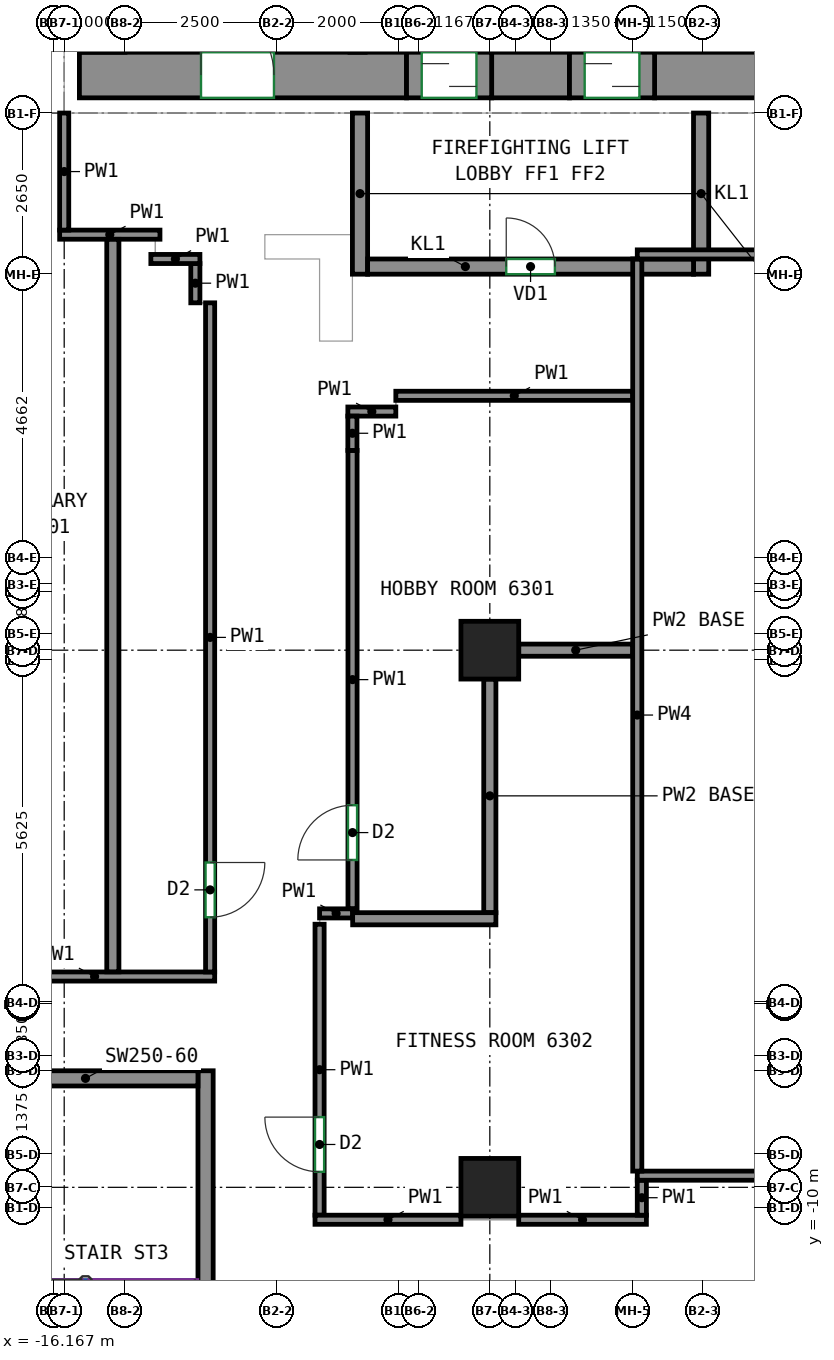
"""IFC4 building model, lengths in metres.
Left out: names, types, materials, properties, quantities, classifications, styles, units other than length and angle.
Written with IfcOpenShell. Run it as: python <this file> out.ifc"""

import sys

from ifc_helpers import new_model, si_unit, direction, frame, frame_2d, origin, origin_2d, place, context, subcontext, project, spatial, rectangle, extrude, source, transform, mapped, element, fill, save


model = new_model("IFC4")
c1 = context("Model", 3, precision=1e-05, world=origin(), true_north=direction((0.0, 1.0)))
c2 = subcontext(c1, "Body", "Model", "MODEL_VIEW")
j1 = project(units=[si_unit("LENGTHUNIT", "METRE"), si_unit("PLANEANGLEUNIT", "RADIAN")], contexts=[c1])
p1 = place(None, origin())
s1 = spatial("IfcSite", under=j1, at=p1, CompositionType="ELEMENT")
p2 = place(p1, origin())
s2 = spatial("IfcBuilding", under=s1, at=p2, CompositionType="ELEMENT")
p3 = place(p2, frame((0.0, 0.0, 259.4)))
s3 = spatial("IfcBuildingStorey", under=s2, at=p3, CompositionType="ELEMENT", Elevation=259.4)
m1 = source(origin(), c2, "Body", "SweptSolid", [
    extrude(rectangle(XDim=0.95, YDim=0.95, at=origin_2d()), origin(), (0.0, 0.0, 1.0), 3.0),
])
for number, where, z_axis, x_axis in (
    (1, (-9.0, -9.667, 0.0), (0.0, 0.0, 1.0), (1.0, 0.0, 0.0)),
    (2, (-9.0, -0.833, 0.0), (0.0, 0.0, 1.0), (1.0, 0.0, 0.0)),
):
    element("IfcColumn", number, at=place(p3, frame(where, z_axis=z_axis, x_axis=x_axis)), inside=s3, PredefinedType="COLUMN", context=c2, shape_type="MappedRepresentation", body=[
        mapped(m1, transform((0.0, 0.0, 0.0))),
    ])
m2 = source(origin(), c2, "Body", "SweptSolid", [
    extrude(rectangle(XDim=5.38, YDim=0.75, at=frame_2d((2.69, 0.0))), origin(), (0.0, 0.0, 1.0), 3.0),
])
p4 = place(p3, frame((-15.75, 8.625, 0.0), z_axis=(0.0, 0.0, 1.0), x_axis=(1.0, 0.0, 0.0)))
e3 = element("IfcWall", 3, at=p4, inside=s3, PredefinedType="SHEAR", context=c2, shape_type="MappedRepresentation", body=[
    mapped(m2, transform((0.0, 0.0, 0.0))),
])
p5 = place(p4, frame((2.0, 0.0, 0.0)))
e4 = element("IfcOpeningElement", 4, at=p5, cuts=e3, PredefinedType="OPENING", context=c2, shape_type="SweptSolid", body=[
    extrude(rectangle(XDim=1.2, YDim=2.1, at=frame_2d((0.6, 1.05))), frame((0.0, 0.385, 0.0), z_axis=(0.0, -1.0, 0.0), x_axis=(1.0, 0.0, 0.0)), (0.0, 0.0, 1.0), 0.77),
])
m3 = source(origin(), c2, "Body", "SweptSolid", [
    extrude(rectangle(XDim=1.28, YDim=0.75, at=frame_2d((0.64, 0.0))), origin(), (0.0, 0.0, 1.0), 3.0),
])
p6 = place(p3, frame((-8.97, 8.625, 0.0), z_axis=(0.0, 0.0, 1.0), x_axis=(1.0, 0.0, 0.0)))
e5 = element("IfcWall", 5, at=p6, inside=s3, PredefinedType="SHEAR", context=c2, shape_type="MappedRepresentation", body=[
    mapped(m3, transform((0.0, 0.0, 0.0))),
])
m4 = source(origin(), c2, "Body", "SweptSolid", [
    extrude(rectangle(XDim=14.18, YDim=0.75, at=frame_2d((7.09, 0.0))), origin(), (0.0, 0.0, 1.0), 3.0),
])
p7 = place(p3, frame((-6.29, 8.625, 0.0), z_axis=(0.0, 0.0, 1.0), x_axis=(1.0, 0.0, 0.0)))
e6 = element("IfcWall", 6, at=p7, inside=s3, PredefinedType="SHEAR", context=c2, shape_type="MappedRepresentation", body=[
    mapped(m4, transform((0.0, 0.0, 0.0))),
])
m5 = source(origin(), c2, "Body", "SweptSolid", [
    extrude(rectangle(XDim=8.0, YDim=0.25, at=frame_2d((4.0, 0.0))), origin(), (0.0, 0.0, 1.0), 3.0),
])
p8 = place(p3, frame((-13.675, -15.75, 0.0), z_axis=(0.0, 0.0, 1.0), x_axis=(0.0, 1.0, 0.0)))
e7 = element("IfcWall", 7, at=p8, inside=s3, PredefinedType="SHEAR", context=c2, shape_type="MappedRepresentation", body=[
    mapped(m5, transform((0.0, 0.0, 0.0))),
])
m6 = source(origin(), c2, "Body", "SweptSolid", [
    extrude(rectangle(XDim=3.7, YDim=0.25, at=frame_2d((1.85, 0.0))), origin(), (0.0, 0.0, 1.0), 3.0),
])
p9 = place(p3, frame((-17.5, -7.875, 0.0), z_axis=(0.0, 0.0, 1.0), x_axis=(1.0, 0.0, 0.0)))
e8 = element("IfcWall", 8, at=p9, inside=s3, PredefinedType="SHEAR", context=c2, shape_type="MappedRepresentation", body=[
    mapped(m6, transform((0.0, 0.0, 0.0))),
])
m7 = source(origin(), c2, "Body", "SweptSolid", [
    extrude(rectangle(XDim=2.65, YDim=0.25, at=frame_2d((1.325, 0.0))), origin(), (0.0, 0.0, 1.0), 2.45),
])
for number, where, z_axis, x_axis in (
    (9, (-11.135, 5.35, 0.0), (0.0, 0.0, 1.0), (0.0, 1.0, 0.0)),
    (10, (-5.525, 5.35, 0.0), (0.0, 0.0, 1.0), (0.0, 1.0, 0.0)),
):
    element("IfcWall", number, at=place(p3, frame(where, z_axis=z_axis, x_axis=x_axis)), inside=s3, PredefinedType="PARTITIONING", context=c2, shape_type="MappedRepresentation", body=[
        mapped(m7, transform((0.0, 0.0, 0.0))),
    ])
m8 = source(origin(), c2, "Body", "SweptSolid", [
    extrude(rectangle(XDim=5.36, YDim=0.25, at=frame_2d((2.68, 0.0))), origin(), (0.0, 0.0, 1.0), 3.0),
])
p10 = place(p3, frame((-11.01, 5.475, 0.0), z_axis=(0.0, 0.0, 1.0), x_axis=(1.0, 0.0, 0.0)))
e11 = element("IfcWall", 11, at=p10, inside=s3, PredefinedType="PARTITIONING", context=c2, shape_type="MappedRepresentation", body=[
    mapped(m8, transform((0.0, 0.0, 0.0))),
])
p11 = place(p10, frame((2.28, 0.0, 0.0)))
e12 = element("IfcOpeningElement", 12, at=p11, cuts=e11, PredefinedType="OPENING", context=c2, shape_type="SweptSolid", body=[
    extrude(rectangle(XDim=0.8, YDim=2.0, at=frame_2d((0.4, 1.0))), frame((0.0, 0.135, 0.0), z_axis=(0.0, -1.0, 0.0), x_axis=(1.0, 0.0, 0.0)), (0.0, 0.0, 1.0), 0.27),
])
m9 = source(origin(), c2, "Body", "SweptSolid", [
    extrude(rectangle(XDim=1.4, YDim=0.75, at=frame_2d((0.7, 0.0))), origin(), (0.0, 0.0, 1.0), 2.7),
])
p12 = place(p3, frame((-10.37, 8.625, 0.0), z_axis=(0.0, 0.0, 1.0), x_axis=(1.0, 0.0, 0.0)))
e13 = element("IfcWall", 13, at=p12, inside=s3, PredefinedType="PARTITIONING", context=c2, shape_type="MappedRepresentation", body=[
    mapped(m9, transform((0.0, 0.0, 0.0))),
])
p13 = place(p12, frame((0.25, 0.0, 0.0)))
e14 = element("IfcOpeningElement", 14, at=p13, cuts=e13, PredefinedType="OPENING", context=c2, shape_type="SweptSolid", body=[
    extrude(rectangle(XDim=0.9, YDim=2.1, at=frame_2d((0.45, 1.05))), frame((0.0, 0.385, 0.0), z_axis=(0.0, -1.0, 0.0), x_axis=(1.0, 0.0, 0.0)), (0.0, 0.0, 1.0), 0.77),
])
m10 = source(origin(), c2, "Body", "SweptSolid", [
    extrude(rectangle(XDim=1.4, YDim=0.75, at=frame_2d((0.7, 0.0))), origin(), (0.0, 0.0, 1.0), 2.7),
])
p14 = place(p3, frame((-7.69, 8.625, 0.0), z_axis=(0.0, 0.0, 1.0), x_axis=(1.0, 0.0, 0.0)))
e15 = element("IfcWall", 15, at=p14, inside=s3, PredefinedType="PARTITIONING", context=c2, shape_type="MappedRepresentation", body=[
    mapped(m10, transform((0.0, 0.0, 0.0))),
])
p15 = place(p14, frame((0.25, 0.0, 0.0)))
e16 = element("IfcOpeningElement", 16, at=p15, cuts=e15, PredefinedType="OPENING", context=c2, shape_type="SweptSolid", body=[
    extrude(rectangle(XDim=0.9, YDim=2.1, at=frame_2d((0.45, 1.05))), frame((0.0, 0.385, 0.0), z_axis=(0.0, -1.0, 0.0), x_axis=(1.0, 0.0, 0.0)), (0.0, 0.0, 1.0), 0.77),
])
p16 = place(p3, frame((-17.475, -6.2, 0.0), z_axis=(0.0, 0.0, 1.0), x_axis=(1.0, 0.0, 0.0)))
e17 = element("IfcWall", 17, at=p16, inside=s3, PredefinedType="PARTITIONING", context=c2, shape_type="SweptSolid", body=[
    extrude(rectangle(XDim=3.95, YDim=0.15, at=frame_2d((1.975, 0.0))), origin(), (0.0, 0.0, 1.0), 3.0),
])
p17 = place(p3, frame((-16.075, 6.0, 0.0), z_axis=(0.0, 0.0, 1.0), x_axis=(1.0, 0.0, 0.0)))
e18 = element("IfcWall", 18, at=p17, inside=s3, PredefinedType="PARTITIONING", context=c2, shape_type="SweptSolid", body=[
    extrude(rectangle(XDim=1.65, YDim=0.15, at=frame_2d((0.825, 0.0))), origin(), (0.0, 0.0, 1.0), 3.0),
])
p18 = place(p3, frame((-16.0, 6.075, 0.0), z_axis=(0.0, 0.0, 1.0), x_axis=(0.0, 1.0, 0.0)))
e19 = element("IfcWall", 19, at=p18, inside=s3, PredefinedType="PARTITIONING", context=c2, shape_type="SweptSolid", body=[
    extrude(rectangle(XDim=1.925, YDim=0.15, at=frame_2d((0.962, 0.0))), origin(), (0.0, 0.0, 1.0), 3.0),
])
p19 = place(p3, frame((-13.6, 4.879, 0.0), z_axis=(0.0, 0.0, 1.0), x_axis=(0.0, -1.0, 0.0)))
e20 = element("IfcWall", 20, at=p19, inside=s3, PredefinedType="PARTITIONING", context=c2, shape_type="SweptSolid", body=[
    extrude(rectangle(XDim=11.004, YDim=0.15, at=frame_2d((5.502, 0.0))), origin(), (0.0, 0.0, 1.0), 3.0),
])
p20 = place(p19, frame((9.204, 0.0, 0.0)))
e21 = element("IfcOpeningElement", 21, at=p20, cuts=e20, PredefinedType="OPENING", context=c2, shape_type="SweptSolid", body=[
    extrude(rectangle(XDim=0.9, YDim=2.1, at=frame_2d((0.45, 1.05))), frame((0.0, 0.085, 0.0), z_axis=(0.0, -1.0, 0.0), x_axis=(1.0, 0.0, 0.0)), (0.0, 0.0, 1.0), 0.17),
])
p21 = place(p3, frame((-13.843, 5.525, 0.0), z_axis=(0.0, 0.0, 1.0), x_axis=(0.0, -1.0, 0.0)))
e22 = element("IfcWall", 22, at=p21, inside=s3, PredefinedType="PARTITIONING", context=c2, shape_type="SweptSolid", body=[
    extrude(rectangle(XDim=0.646, YDim=0.15, at=frame_2d((0.323, 0.0))), origin(), (0.0, 0.0, 1.0), 3.0),
])
p22 = place(p3, frame((-14.575, 5.6, 0.0), z_axis=(0.0, 0.0, 1.0), x_axis=(1.0, 0.0, 0.0)))
e23 = element("IfcWall", 23, at=p22, inside=s3, PredefinedType="PARTITIONING", context=c2, shape_type="SweptSolid", body=[
    extrude(rectangle(XDim=0.807, YDim=0.15, at=frame_2d((0.403, 0.0))), origin(), (0.0, 0.0, 1.0), 3.0),
])
p23 = place(p3, frame((-11.258, -5.087, 0.0), z_axis=(0.0, 0.0, 1.0), x_axis=(0.0, 1.0, 0.0)))
e24 = element("IfcWall", 24, at=p23, inside=s3, PredefinedType="PARTITIONING", context=c2, shape_type="SweptSolid", body=[
    extrude(rectangle(XDim=7.539, YDim=0.15, at=frame_2d((3.77, 0.0))), origin(), (0.0, 0.0, 1.0), 3.0),
])
p24 = place(p23, frame((0.804, 0.0, 0.0)))
e25 = element("IfcOpeningElement", 25, at=p24, cuts=e24, PredefinedType="OPENING", context=c2, shape_type="SweptSolid", body=[
    extrude(rectangle(XDim=0.9, YDim=2.1, at=frame_2d((0.45, 1.05))), frame((0.0, 0.085, 0.0), z_axis=(0.0, -1.0, 0.0), x_axis=(1.0, 0.0, 0.0)), (0.0, 0.0, 1.0), 0.17),
])
p25 = place(p3, frame((-11.8, -5.162, 0.0), z_axis=(0.0, 0.0, 1.0), x_axis=(1.0, 0.0, 0.0)))
e26 = element("IfcWall", 26, at=p25, inside=s3, PredefinedType="PARTITIONING", context=c2, shape_type="SweptSolid", body=[
    extrude(rectangle(XDim=0.544, YDim=0.15, at=frame_2d((0.272, 0.0))), origin(), (0.0, 0.0, 1.0), 3.0),
])
p26 = place(p3, frame((-10.546, 3.35, 0.0), z_axis=(0.0, 0.0, 1.0), x_axis=(1.0, 0.0, 0.0)))
e27 = element("IfcWall", 27, at=p26, inside=s3, PredefinedType="PARTITIONING", context=c2, shape_type="SweptSolid", body=[
    extrude(rectangle(XDim=3.896, YDim=0.15, at=frame_2d((1.948, 0.0))), origin(), (0.0, 0.0, 1.0), 3.0),
])
p27 = place(p3, frame((-11.335, 3.091, 0.0), z_axis=(0.0, 0.0, 1.0), x_axis=(1.0, 0.0, 0.0)))
e28 = element("IfcWall", 28, at=p27, inside=s3, PredefinedType="PARTITIONING", context=c2, shape_type="SweptSolid", body=[
    extrude(rectangle(XDim=0.789, YDim=0.15, at=frame_2d((0.395, 0.0))), origin(), (0.0, 0.0, 1.0), 3.0),
])
p28 = place(p3, frame((-11.26, 2.452, 0.0), z_axis=(0.0, 0.0, 1.0), x_axis=(0.0, 1.0, 0.0)))
e29 = element("IfcWall", 29, at=p28, inside=s3, PredefinedType="PARTITIONING", context=c2, shape_type="SweptSolid", body=[
    extrude(rectangle(XDim=0.564, YDim=0.15, at=frame_2d((0.282, 0.0))), origin(), (0.0, 0.0, 1.0), 3.0),
])
p29 = place(p3, frame((-11.8, -10.125, 0.0), z_axis=(0.0, 0.0, 1.0), x_axis=(0.0, 1.0, 0.0)))
e30 = element("IfcWall", 30, at=p29, inside=s3, PredefinedType="PARTITIONING", context=c2, shape_type="SweptSolid", body=[
    extrude(rectangle(XDim=4.785, YDim=0.15, at=frame_2d((2.393, 0.0))), origin(), (0.0, 0.0, 1.0), 3.0),
])
p30 = place(p29, frame((0.713, 0.0, 0.0)))
e31 = element("IfcOpeningElement", 31, at=p30, cuts=e30, PredefinedType="OPENING", context=c2, shape_type="SweptSolid", body=[
    extrude(rectangle(XDim=0.9, YDim=2.1, at=frame_2d((0.45, 1.05))), frame((0.0, 0.085, 0.0), z_axis=(0.0, -1.0, 0.0), x_axis=(1.0, 0.0, 0.0)), (0.0, 0.0, 1.0), 0.17),
])
p31 = place(p3, frame((-8.525, -10.2, 0.0), z_axis=(0.0, 0.0, 1.0), x_axis=(1.0, 0.0, 0.0)))
e32 = element("IfcWall", 32, at=p31, inside=s3, PredefinedType="PARTITIONING", context=c2, shape_type="SweptSolid", body=[
    extrude(rectangle(XDim=2.1, YDim=0.15, at=frame_2d((1.05, 0.0))), origin(), (0.0, 0.0, 1.0), 3.0),
])
p32 = place(p3, frame((-11.875, -10.2, 0.0), z_axis=(0.0, 0.0, 1.0), x_axis=(1.0, 0.0, 0.0)))
e33 = element("IfcWall", 33, at=p32, inside=s3, PredefinedType="PARTITIONING", context=c2, shape_type="SweptSolid", body=[
    extrude(rectangle(XDim=2.4, YDim=0.15, at=frame_2d((1.2, 0.0))), origin(), (0.0, 0.0, 1.0), 3.0),
])
p33 = place(p3, frame((-6.5, -9.55, 0.0), z_axis=(0.0, 0.0, 1.0), x_axis=(0.0, -1.0, 0.0)))
e34 = element("IfcWall", 34, at=p33, inside=s3, PredefinedType="PARTITIONING", context=c2, shape_type="SweptSolid", body=[
    extrude(rectangle(XDim=0.575, YDim=0.15, at=frame_2d((0.288, 0.0))), origin(), (0.0, 0.0, 1.0), 3.0),
])
p34 = place(p3, frame((-15.2, -6.123, 0.0), z_axis=(0.0, 0.0, 1.0), x_axis=(0.0, 1.0, 0.0)))
e35 = element("IfcWall", 35, at=p34, inside=s3, PredefinedType="PARTITIONING", context=c2, shape_type="SweptSolid", body=[
    extrude(rectangle(XDim=12.046, YDim=0.2, at=frame_2d((6.023, 0.0))), origin(), (0.0, 0.0, 1.0), 3.0),
])
p35 = place(p3, frame((-8.525, -0.833, 0.0), z_axis=(0.0, 0.0, 1.0), x_axis=(1.0, 0.0, 0.0)))
e36 = element("IfcWall", 36, at=p35, inside=s3, PredefinedType="PARTITIONING", context=c2, shape_type="SweptSolid", body=[
    extrude(rectangle(XDim=1.875, YDim=0.2, at=frame_2d((0.938, 0.0))), origin(), (0.0, 0.0, 1.0), 2.45),
])
p36 = place(p3, frame((-9.0, -5.15, 0.0), z_axis=(0.0, 0.0, 1.0), x_axis=(0.0, 1.0, 0.0)))
e37 = element("IfcWall", 37, at=p36, inside=s3, PredefinedType="PARTITIONING", context=c2, shape_type="SweptSolid", body=[
    extrude(rectangle(XDim=3.842, YDim=0.2, at=frame_2d((1.921, 0.0))), origin(), (0.0, 0.0, 1.0), 2.45),
])
p37 = place(p3, frame((-11.256, -5.25, 0.0), z_axis=(0.0, 0.0, 1.0), x_axis=(1.0, 0.0, 0.0)))
e38 = element("IfcWall", 38, at=p37, inside=s3, PredefinedType="PARTITIONING", context=c2, shape_type="SweptSolid", body=[
    extrude(rectangle(XDim=2.356, YDim=0.2, at=frame_2d((1.178, 0.0))), origin(), (0.0, 0.0, 1.0), 3.0),
])
p38 = place(p3, frame((8.5, -9.475, 0.0), z_axis=(0.0, 0.0, 1.0), x_axis=(-1.0, 0.0, 0.0)))
e39 = element("IfcWall", 39, at=p38, inside=s3, PredefinedType="PARTITIONING", context=c2, shape_type="SweptSolid", body=[
    extrude(rectangle(XDim=15.075, YDim=0.15, at=frame_2d((7.538, 0.0))), origin(), (0.0, 0.0, 1.0), 2.45),
])
p39 = place(p3, frame((-6.575, -9.4, 0.0), z_axis=(0.0, 0.0, 1.0), x_axis=(0.0, 1.0, 0.0)))
e40 = element("IfcWall", 40, at=p39, inside=s3, PredefinedType="PARTITIONING", context=c2, shape_type="SweptSolid", body=[
    extrude(rectangle(XDim=15.0, YDim=0.15, at=frame_2d((7.5, 0.0))), origin(), (0.0, 0.0, 1.0), 3.0),
])
p40 = place(p3, frame((-6.575, 5.675, 0.0), z_axis=(0.0, 0.0, 1.0), x_axis=(1.0, 0.0, 0.0)))
e41 = element("IfcWall", 41, at=p40, inside=s3, PredefinedType="PARTITIONING", context=c2, shape_type="SweptSolid", body=[
    extrude(rectangle(XDim=15.075, YDim=0.15, at=frame_2d((7.538, 0.0))), origin(), (0.0, 0.0, 1.0), 3.0),
])
p41 = place(p11, origin())
e42 = element("IfcDoor", 42, at=p41, inside=s3, OperationType="SINGLE_SWING_LEFT", PredefinedType="DOOR", context=c2, shape_type="SweptSolid", body=[
    extrude(rectangle(XDim=0.8, YDim=2.0, at=frame_2d((0.4, 1.0))), frame((0.0, 0.025, 0.0), z_axis=(0.0, -1.0, 0.0), x_axis=(1.0, 0.0, 0.0)), (0.0, 0.0, 1.0), 0.05),
])
fill(e12, e42)
p42 = place(p13, origin())
e43 = element("IfcDoor", 43, at=p42, inside=s3, OperationType="SLIDING_TO_LEFT", PredefinedType="DOOR", context=c2, shape_type="SweptSolid", body=[
    extrude(rectangle(XDim=0.9, YDim=2.1, at=frame_2d((0.45, 1.05))), frame((0.0, 0.28, 0.0), z_axis=(0.0, -1.0, 0.0), x_axis=(1.0, 0.0, 0.0)), (0.0, 0.0, 1.0), 0.05),
])
fill(e14, e43)
p43 = place(p15, origin())
e44 = element("IfcDoor", 44, at=p43, inside=s3, OperationType="SLIDING_TO_RIGHT", PredefinedType="DOOR", context=c2, shape_type="SweptSolid", body=[
    extrude(rectangle(XDim=0.9, YDim=2.1, at=frame_2d((0.45, 1.05))), frame((0.0, 0.28, 0.0), z_axis=(0.0, -1.0, 0.0), x_axis=(1.0, 0.0, 0.0)), (0.0, 0.0, 1.0), 0.05),
])
fill(e16, e44)
p44 = place(p5, origin())
e45 = element("IfcDoor", 45, at=p44, inside=s3, OperationType="DOUBLE_DOOR_SINGLE_SWING", PredefinedType="DOOR", context=c2, shape_type="SweptSolid", body=[
    extrude(rectangle(XDim=1.2, YDim=2.1, at=frame_2d((0.6, 1.05))), frame((0.0, 0.28, 0.0), z_axis=(0.0, -1.0, 0.0), x_axis=(1.0, 0.0, 0.0)), (0.0, 0.0, 1.0), 0.05),
])
fill(e4, e45)
p45 = place(p30, origin())
e46 = element("IfcDoor", 46, at=p45, inside=s3, OperationType="SINGLE_SWING_RIGHT", PredefinedType="DOOR", context=c2, shape_type="SweptSolid", body=[
    extrude(rectangle(XDim=0.9, YDim=2.1, at=frame_2d((0.45, 1.05))), frame((0.0, 0.025, 0.0), z_axis=(0.0, -1.0, 0.0), x_axis=(1.0, 0.0, 0.0)), (0.0, 0.0, 1.0), 0.05),
])
fill(e31, e46)
p46 = place(p20, origin())
e47 = element("IfcDoor", 47, at=p46, inside=s3, OperationType="SINGLE_SWING_LEFT", PredefinedType="DOOR", context=c2, shape_type="SweptSolid", body=[
    extrude(rectangle(XDim=0.9, YDim=2.1, at=frame_2d((0.45, 1.05))), frame((0.0, 0.025, 0.0), z_axis=(0.0, -1.0, 0.0), x_axis=(1.0, 0.0, 0.0)), (0.0, 0.0, 1.0), 0.05),
])
fill(e21, e47)
p47 = place(p24, origin())
e48 = element("IfcDoor", 48, at=p47, inside=s3, OperationType="SINGLE_SWING_LEFT", PredefinedType="DOOR", context=c2, shape_type="SweptSolid", body=[
    extrude(rectangle(XDim=0.9, YDim=2.1, at=frame_2d((0.45, 1.05))), frame((0.0, 0.025, 0.0), z_axis=(0.0, -1.0, 0.0), x_axis=(1.0, 0.0, 0.0)), (0.0, 0.0, 1.0), 0.05),
])
fill(e25, e48)
save(model, sys.argv[1])
